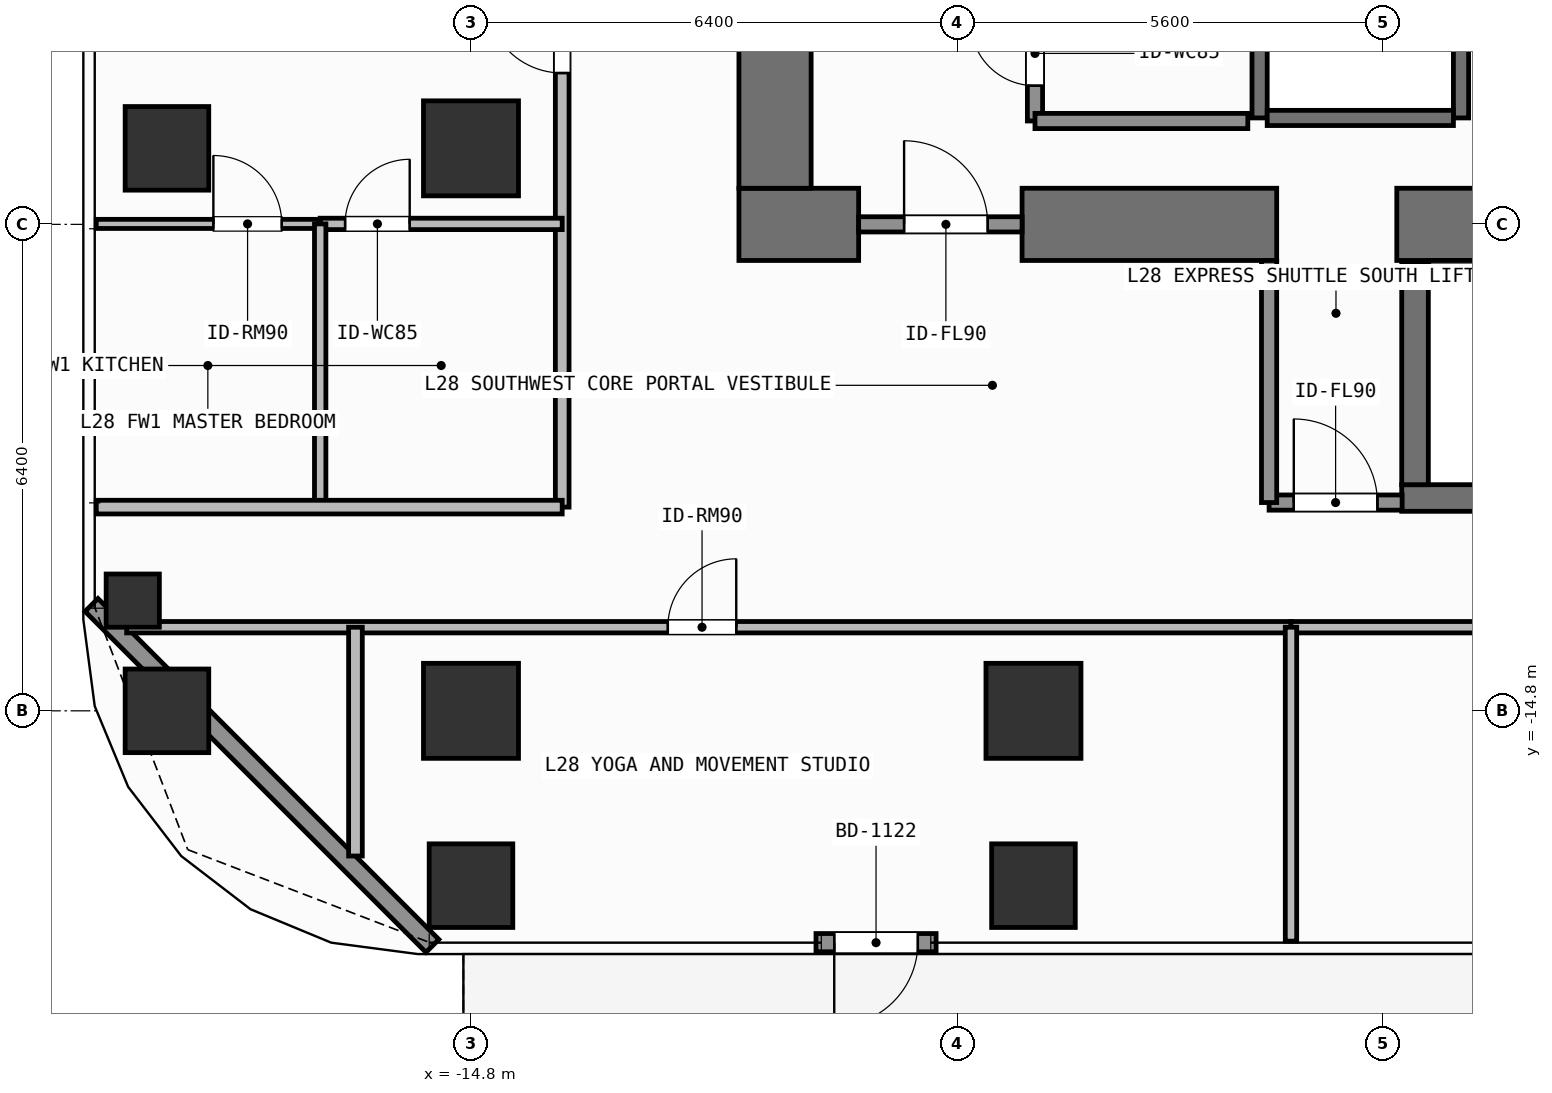
"""IFC4 building model, lengths in metres.
Left out: names, types, materials, properties, quantities, classifications, styles, units other than length and angle.
Written with IfcOpenShell. Run it as: python <this file> out.ifc"""

import sys

from ifc_helpers import new_model, si_unit, direction, frame, frame_2d, origin, origin_2d, place, context, subcontext, project, spatial, rectangle, hollow_rectangle, extrude, element, fill, save


model = new_model("IFC4")
c1 = context("Model", 3, precision=1e-05, world=origin(), true_north=direction((0.0, 1.0)))
c2 = subcontext(c1, "Body", "Model", "MODEL_VIEW")
j1 = project(units=[si_unit("LENGTHUNIT", "METRE"), si_unit("PLANEANGLEUNIT", "RADIAN")], contexts=[c1])
p1 = place(None, origin())
s1 = spatial("IfcSite", under=j1, at=p1, CompositionType="ELEMENT")
p2 = place(p1, origin())
s2 = spatial("IfcBuilding", under=s1, at=p2, CompositionType="ELEMENT")
p3 = place(p2, frame((0.0, 0.0, 113.4)))
s3 = spatial("IfcBuildingStorey", under=s2, at=p3, CompositionType="ELEMENT", Elevation=113.4)
p4 = place(p3, frame((-11.275, -8.4, 0.0), z_axis=(0.0, 0.0, 1.0), x_axis=(1.0, 0.0, 0.0)))
e1 = element("IfcWall", 1, at=p4, inside=s3, PredefinedType="SHEAR", context=c2, shape_type="SweptSolid", body=[
    extrude(rectangle(XDim=1.575, YDim=0.95, at=frame_2d((0.788, 0.0))), origin(), (0.0, 0.0, 1.0), 3.9),
])
p5 = place(p3, frame((-7.55, -8.4, 0.0), z_axis=(0.0, 0.0, 1.0), x_axis=(1.0, 0.0, 0.0)))
e2 = element("IfcWall", 2, at=p5, inside=s3, PredefinedType="SHEAR", context=c2, shape_type="SweptSolid", body=[
    extrude(rectangle(XDim=3.35, YDim=0.95, at=frame_2d((1.675, 0.0))), origin(), (0.0, 0.0, 1.0), 3.9),
])
p6 = place(p3, frame((-2.62, -8.4, 0.0), z_axis=(0.0, 0.0, 1.0), x_axis=(1.0, 0.0, 0.0)))
e3 = element("IfcWall", 3, at=p6, inside=s3, PredefinedType="SHEAR", context=c2, shape_type="SweptSolid", body=[
    extrude(rectangle(XDim=7.27, YDim=0.95, at=frame_2d((3.635, 0.0))), origin(), (0.0, 0.0, 1.0), 3.9),
])
p7 = place(p3, frame((-10.8, -7.925, 0.0), z_axis=(0.0, 0.0, 1.0), x_axis=(0.0, 1.0, 0.0)))
e4 = element("IfcWall", 4, at=p7, inside=s3, PredefinedType="SHEAR", context=c2, shape_type="SweptSolid", body=[
    extrude(rectangle(XDim=15.85, YDim=0.95, at=frame_2d((7.925, 0.0))), origin(), (0.0, 0.0, 1.0), 3.9),
])
p8 = place(p3, frame((-2.555, -12.0, 0.0), z_axis=(0.0, 0.0, 1.0), x_axis=(1.0, 0.0, 0.0)))
e5 = element("IfcWall", 5, at=p8, inside=s3, PredefinedType="SHEAR", context=c2, shape_type="SweptSolid", body=[
    extrude(rectangle(XDim=7.31, YDim=0.35, at=frame_2d((3.655, 0.0))), origin(), (0.0, 0.0, 1.0), 3.9),
])
p9 = place(p3, frame((-2.2, -8.95, 0.0), z_axis=(0.0, 0.0, 1.0), x_axis=(1.0, 0.0, 0.0)))
e6 = element("IfcWall", 6, at=p9, inside=s3, PredefinedType="SHEAR", context=c2, shape_type="SweptSolid", body=[
    extrude(rectangle(XDim=6.6, YDim=0.15, at=frame_2d((3.3, 0.0))), origin(), (0.0, 0.0, 1.0), 3.9),
])
p10 = place(p3, frame((-2.38, -11.825, 0.0), z_axis=(0.0, 0.0, 1.0), x_axis=(0.0, 1.0, 0.0)))
e7 = element("IfcWall", 7, at=p10, inside=s3, PredefinedType="SHEAR", context=c2, shape_type="SweptSolid", body=[
    extrude(rectangle(XDim=2.925, YDim=0.35, at=frame_2d((1.462, 0.0))), origin(), (0.0, 0.0, 1.0), 3.9),
])
for number, where, z_axis, x_axis in (
    (8, (-14.8, -14.8, 0.0), (0.0, 0.0, 1.0), (1.0, 0.0, 0.0)),
    (9, (-7.4, -14.8, 0.0), (0.0, 0.0, 1.0), (1.0, 0.0, 0.0)),
    (10, (-14.8, -7.4, 0.0), (0.0, 0.0, 1.0), (1.0, 0.0, 0.0)),
):
    element("IfcColumn", number, at=place(p3, frame(where, z_axis=z_axis, x_axis=x_axis)), inside=s3, PredefinedType="COLUMN", context=c2, shape_type="SweptSolid", body=[
        extrude(rectangle(XDim=1.25, YDim=1.25, at=origin_2d()), origin(), (0.0, 0.0, 1.0), 3.9),
    ])
for number, where, z_axis, x_axis in (
    (11, (-18.8, -14.8, 0.0), (0.0, 0.0, 1.0), (1.0, 0.0, 0.0)),
    (12, (-18.8, -7.4, 0.0), (0.0, 0.0, 1.0), (1.0, 0.0, 0.0)),
    (13, (-14.8, -17.1, 0.0), (0.0, 0.0, 1.0), (1.0, 0.0, 0.0)),
    (14, (-7.4, -17.1, 0.0), (0.0, 0.0, 1.0), (1.0, 0.0, 0.0)),
):
    element("IfcColumn", number, at=place(p3, frame(where, z_axis=z_axis, x_axis=x_axis)), inside=s3, PredefinedType="COLUMN", context=c2, shape_type="SweptSolid", body=[
        extrude(rectangle(XDim=1.1, YDim=1.1, at=origin_2d()), origin(), (0.0, 0.0, 1.0), 3.9),
    ])
p11 = place(p3, frame((-19.25, -13.35, 0.0), z_axis=(0.0, 0.0, 1.0), x_axis=(1.0, 0.0, 0.0)))
e15 = element("IfcColumn", 15, at=p11, inside=s3, PredefinedType="COLUMN", context=c2, shape_type="SweptSolid", body=[
    extrude(hollow_rectangle(XDim=0.7, YDim=0.7, WallThickness=0.032, at=origin_2d()), origin(), (0.0, 0.0, 1.0), 3.9),
])
p12 = place(p3, frame((-8.681, -17.85, 0.0), z_axis=(0.0, 0.0, 1.0), x_axis=(-1.0, 0.0, 0.0)))
e16 = element("IfcWall", 16, at=p12, inside=s3, PredefinedType="SOLIDWALL", context=c2, shape_type="SweptSolid", body=[
    extrude(rectangle(XDim=1.58, YDim=0.24, at=frame_2d((0.79, 0.0))), origin(), (0.0, 0.0, 1.0), 3.68),
])
p13 = place(p12, frame((0.24, 0.0, 0.0)))
e17 = element("IfcOpeningElement", 17, at=p13, cuts=e16, PredefinedType="OPENING", context=c2, shape_type="SweptSolid", body=[
    extrude(rectangle(XDim=1.1, YDim=2.2, at=frame_2d((0.55, 1.1))), frame((0.0, 0.13, 0.0), z_axis=(0.0, -1.0, 0.0), x_axis=(1.0, 0.0, 0.0)), (0.0, 0.0, 1.0), 0.26),
])
p14 = place(p3, frame((-15.308, -17.892, 0.0), z_axis=(0.0, 0.0, 1.0), x_axis=(-0.707126027686, 0.707087534163, 0.0)))
e18 = element("IfcWall", 18, at=p14, inside=s3, PredefinedType="SOLIDWALL", context=c2, shape_type="SweptSolid", body=[
    extrude(rectangle(XDim=6.342, YDim=0.24, at=frame_2d((3.171, 0.0))), origin(), (0.0, 0.0, 1.0), 3.68),
])
for number, where, z_axis, x_axis in (
    (19, (-4.425, -7.0, 0.0), (0.0, 0.0, 1.0), (0.0, 1.0, 0.0)),
    (20, (-1.775, -7.0, 0.0), (0.0, 0.0, 1.0), (0.0, 1.0, 0.0)),
):
    element("IfcWall", number, at=place(p3, frame(where, z_axis=z_axis, x_axis=x_axis)), inside=s3, PredefinedType="SHEAR", context=c2, shape_type="SweptSolid", body=[
        extrude(rectangle(XDim=2.8, YDim=0.2, at=frame_2d((1.4, 0.0))), origin(), (0.0, 0.0, 1.0), 3.68),
    ])
p15 = place(p3, frame((-4.325, -7.0, 0.0), z_axis=(0.0, 0.0, 1.0), x_axis=(1.0, 0.0, 0.0)))
e21 = element("IfcWall", 21, at=p15, inside=s3, PredefinedType="SHEAR", context=c2, shape_type="SweptSolid", body=[
    extrude(rectangle(XDim=2.45, YDim=0.2, at=frame_2d((1.225, 0.0))), origin(), (0.0, 0.0, 1.0), 3.68),
])
p16 = place(p3, frame((-9.7, -8.4, 0.0), z_axis=(0.0, 0.0, 1.0), x_axis=(1.0, 0.0, 0.0)))
e22 = element("IfcWall", 22, at=p16, inside=s3, PredefinedType="SOLIDWALL", context=c2, shape_type="SweptSolid", body=[
    extrude(rectangle(XDim=2.15, YDim=0.2, at=frame_2d((1.075, 0.0))), origin(), (0.0, 0.0, 1.0), 2.72),
])
p17 = place(p16, frame((0.598, 0.0, 0.0)))
e23 = element("IfcOpeningElement", 23, at=p17, cuts=e22, PredefinedType="OPENING", context=c2, shape_type="SweptSolid", body=[
    extrude(rectangle(XDim=1.1, YDim=2.15, at=frame_2d((0.55, 1.075))), frame((0.0, 0.11, 0.0), z_axis=(0.0, -1.0, 0.0), x_axis=(1.0, 0.0, 0.0)), (0.0, 0.0, 1.0), 0.22),
])
p18 = place(p3, frame((-4.3, -12.06, 0.0), z_axis=(0.0, 0.0, 1.0), x_axis=(1.0, 0.0, 0.0)))
e24 = element("IfcWall", 24, at=p18, inside=s3, PredefinedType="SOLIDWALL", context=c2, shape_type="SweptSolid", body=[
    extrude(rectangle(XDim=1.75, YDim=0.2, at=frame_2d((0.875, 0.0))), origin(), (0.0, 0.0, 1.0), 3.68),
])
p19 = place(p18, frame((0.325, 0.0, 0.0)))
e25 = element("IfcOpeningElement", 25, at=p19, cuts=e24, PredefinedType="OPENING", context=c2, shape_type="SweptSolid", body=[
    extrude(rectangle(XDim=1.1, YDim=2.15, at=frame_2d((0.55, 1.075))), frame((0.0, 0.11, 0.0), z_axis=(0.0, -1.0, 0.0), x_axis=(1.0, 0.0, 0.0)), (0.0, 0.0, 1.0), 0.22),
])
p20 = place(p3, frame((-7.38, -7.04, 0.0), z_axis=(0.0, 0.0, 1.0), x_axis=(0.0, 1.0, 0.0)))
e26 = element("IfcWall", 26, at=p20, inside=s3, PredefinedType="SOLIDWALL", context=c2, shape_type="SweptSolid", body=[
    extrude(rectangle(XDim=1.93, YDim=0.2, at=frame_2d((0.965, 0.0))), origin(), (0.0, 0.0, 1.0), 3.68),
])
p21 = place(p20, frame((0.464, 0.0, 0.0)))
e27 = element("IfcOpeningElement", 27, at=p21, cuts=e26, PredefinedType="OPENING", context=c2, shape_type="SweptSolid", body=[
    extrude(rectangle(XDim=0.85, YDim=2.1, at=frame_2d((0.425, 1.05))), frame((0.0, 0.11, 0.0), z_axis=(0.0, -1.0, 0.0), x_axis=(1.0, 0.0, 0.0)), (0.0, 0.0, 1.0), 0.22),
])
p22 = place(p3, frame((-19.33, -13.7, 0.0), z_axis=(0.0, 0.0, 1.0), x_axis=(1.0, 0.0, 0.0)))
e28 = element("IfcWall", 28, at=p22, inside=s3, PredefinedType="PARTITIONING", context=c2, shape_type="SweptSolid", body=[
    extrude(rectangle(XDim=15.318, YDim=0.15, at=frame_2d((7.659, 0.0))), origin(), (0.0, 0.0, 1.0), 3.68),
])
p23 = place(p22, frame((7.12, 0.0, 0.0)))
e29 = element("IfcOpeningElement", 29, at=p23, cuts=e28, PredefinedType="OPENING", context=c2, shape_type="SweptSolid", body=[
    extrude(rectangle(XDim=0.9, YDim=2.1, at=frame_2d((0.45, 1.05))), frame((0.0, 0.085, 0.0), z_axis=(0.0, -1.0, 0.0), x_axis=(1.0, 0.0, 0.0)), (0.0, 0.0, 1.0), 0.17),
])
p24 = place(p3, frame((-4.012, -13.7, 0.0), z_axis=(0.0, 0.0, 1.0), x_axis=(1.0, 0.0, 0.0)))
e30 = element("IfcWall", 30, at=p24, inside=s3, PredefinedType="PARTITIONING", context=c2, shape_type="SweptSolid", body=[
    extrude(rectangle(XDim=9.773, YDim=0.15, at=frame_2d((4.886, 0.0))), origin(), (0.0, 0.0, 1.0), 3.68),
])
p25 = place(p24, frame((4.793, 0.0, 0.0)))
e31 = element("IfcOpeningElement", 31, at=p25, cuts=e30, PredefinedType="OPENING", context=c2, shape_type="SweptSolid", body=[
    extrude(rectangle(XDim=0.9, YDim=2.1, at=frame_2d((0.45, 1.05))), frame((0.0, 0.085, 0.0), z_axis=(0.0, -1.0, 0.0), x_axis=(1.0, 0.0, 0.0)), (0.0, 0.0, 1.0), 0.17),
])
p26 = place(p3, frame((-13.6, -12.12, 0.0), z_axis=(0.0, 0.0, 1.0), x_axis=(0.0, 1.0, 0.0)))
e32 = element("IfcWall", 32, at=p26, inside=s3, PredefinedType="PARTITIONING", context=c2, shape_type="SweptSolid", body=[
    extrude(rectangle(XDim=13.138, YDim=0.18, at=frame_2d((6.569, 0.0))), origin(), (0.0, 0.0, 1.0), 3.68),
])
p27 = place(p26, frame((5.711, 0.0, 0.0)))
e33 = element("IfcOpeningElement", 33, at=p27, cuts=e32, PredefinedType="OPENING", context=c2, shape_type="SweptSolid", body=[
    extrude(rectangle(XDim=1.0, YDim=2.2, at=frame_2d((0.5, 1.1))), frame((0.0, 0.1, 0.0), z_axis=(0.0, -1.0, 0.0), x_axis=(1.0, 0.0, 0.0)), (0.0, 0.0, 1.0), 0.2),
])
p28 = place(p3, frame((-16.784, -8.394, 0.0), z_axis=(0.0, 0.0, 1.0), x_axis=(1.0, 0.0, 0.0)))
e34 = element("IfcWall", 34, at=p28, inside=s3, PredefinedType="PARTITIONING", context=c2, shape_type="SweptSolid", body=[
    extrude(rectangle(XDim=3.184, YDim=0.15, at=frame_2d((1.592, 0.0))), origin(), (0.0, 0.0, 1.0), 3.68),
])
p29 = place(p28, frame((0.328, 0.0, 0.0)))
e35 = element("IfcOpeningElement", 35, at=p29, cuts=e34, PredefinedType="OPENING", context=c2, shape_type="SweptSolid", body=[
    extrude(rectangle(XDim=0.85, YDim=2.1, at=frame_2d((0.425, 1.05))), frame((0.0, 0.085, 0.0), z_axis=(0.0, -1.0, 0.0), x_axis=(1.0, 0.0, 0.0)), (0.0, 0.0, 1.0), 0.17),
])
p30 = place(p3, frame((-19.73, -8.394, 0.0), z_axis=(0.0, 0.0, 1.0), x_axis=(1.0, 0.0, 0.0)))
e36 = element("IfcWall", 36, at=p30, inside=s3, PredefinedType="PARTITIONING", context=c2, shape_type="SweptSolid", body=[
    extrude(rectangle(XDim=2.946, YDim=0.12, at=frame_2d((1.473, 0.0))), origin(), (0.0, 0.0, 1.0), 3.68),
])
p31 = place(p30, frame((1.541, 0.0, 0.0)))
e37 = element("IfcOpeningElement", 37, at=p31, cuts=e36, PredefinedType="OPENING", context=c2, shape_type="SweptSolid", body=[
    extrude(rectangle(XDim=0.9, YDim=2.1, at=frame_2d((0.45, 1.05))), frame((0.0, 0.07, 0.0), z_axis=(0.0, -1.0, 0.0), x_axis=(1.0, 0.0, 0.0)), (0.0, 0.0, 1.0), 0.14),
])
p32 = place(p3, frame((-4.3, -12.06, 0.0), z_axis=(0.0, 0.0, 1.0), x_axis=(0.0, 1.0, 0.0)))
e38 = element("IfcWall", 38, at=p32, inside=s3, PredefinedType="SOLIDWALL", context=c2, shape_type="SweptSolid", body=[
    extrude(rectangle(XDim=3.185, YDim=0.2, at=frame_2d((1.593, 0.0))), origin(), (0.0, 0.0, 1.0), 3.68),
])
p33 = place(p3, frame((-7.38, -7.04, 0.0), z_axis=(0.0, 0.0, 1.0), x_axis=(1.0, 0.0, 0.0)))
e39 = element("IfcWall", 39, at=p33, inside=s3, PredefinedType="SOLIDWALL", context=c2, shape_type="SweptSolid", body=[
    extrude(rectangle(XDim=2.8, YDim=0.2, at=frame_2d((1.4, 0.0))), origin(), (0.0, 0.0, 1.0), 3.68),
])
p34 = place(p3, frame((-16.32, -16.71, 0.0), z_axis=(0.0, 0.0, 1.0), x_axis=(0.0, 1.0, 0.0)))
e40 = element("IfcWall", 40, at=p34, inside=s3, PredefinedType="PARTITIONING", context=c2, shape_type="SweptSolid", body=[
    extrude(rectangle(XDim=3.01, YDim=0.18, at=frame_2d((1.505, 0.0))), origin(), (0.0, 0.0, 1.0), 3.68),
])
p35 = place(p3, frame((-4.012, -17.83, 0.0), z_axis=(0.0, 0.0, 1.0), x_axis=(0.0, 1.0, 0.0)))
e41 = element("IfcWall", 41, at=p35, inside=s3, PredefinedType="PARTITIONING", context=c2, shape_type="SweptSolid", body=[
    extrude(rectangle(XDim=4.13, YDim=0.15, at=frame_2d((2.065, 0.0))), origin(), (0.0, 0.0, 1.0), 3.68),
])
p36 = place(p3, frame((-16.784, -12.12, 0.0), z_axis=(0.0, 0.0, 1.0), x_axis=(0.0, 1.0, 0.0)))
e42 = element("IfcWall", 42, at=p36, inside=s3, PredefinedType="PARTITIONING", context=c2, shape_type="SweptSolid", body=[
    extrude(rectangle(XDim=3.726, YDim=0.15, at=frame_2d((1.863, 0.0))), origin(), (0.0, 0.0, 1.0), 3.68),
])
p37 = place(p3, frame((-19.73, -12.12, 0.0), z_axis=(0.0, 0.0, 1.0), x_axis=(1.0, 0.0, 0.0)))
e43 = element("IfcWall", 43, at=p37, inside=s3, PredefinedType="PARTITIONING", context=c2, shape_type="SweptSolid", body=[
    extrude(rectangle(XDim=6.13, YDim=0.18, at=frame_2d((3.065, 0.0))), origin(), (0.0, 0.0, 1.0), 3.68),
])
p38 = place(p13, origin())
e44 = element("IfcDoor", 44, at=p38, inside=s3, OperationType="SINGLE_SWING_RIGHT", PredefinedType="DOOR", context=c2, shape_type="SweptSolid", body=[
    extrude(rectangle(XDim=1.1, YDim=2.2, at=frame_2d((0.55, 1.1))), frame((0.0, 0.025, 0.0), z_axis=(0.0, -1.0, 0.0), x_axis=(1.0, 0.0, 0.0)), (0.0, 0.0, 1.0), 0.05),
])
fill(e17, e44)
p39 = place(p17, origin())
e45 = element("IfcDoor", 45, at=p39, inside=s3, OperationType="SINGLE_SWING_LEFT", PredefinedType="DOOR", context=c2, shape_type="SweptSolid", body=[
    extrude(rectangle(XDim=1.1, YDim=2.15, at=frame_2d((0.55, 1.075))), frame((0.0, 0.025, 0.0), z_axis=(0.0, -1.0, 0.0), x_axis=(1.0, 0.0, 0.0)), (0.0, 0.0, 1.0), 0.05),
])
fill(e23, e45)
p40 = place(p19, origin())
e46 = element("IfcDoor", 46, at=p40, inside=s3, OperationType="SINGLE_SWING_LEFT", PredefinedType="DOOR", context=c2, shape_type="SweptSolid", body=[
    extrude(rectangle(XDim=1.1, YDim=2.15, at=frame_2d((0.55, 1.075))), frame((0.0, 0.025, 0.0), z_axis=(0.0, -1.0, 0.0), x_axis=(1.0, 0.0, 0.0)), (0.0, 0.0, 1.0), 0.05),
])
fill(e25, e46)
p41 = place(p21, origin())
e47 = element("IfcDoor", 47, at=p41, inside=s3, OperationType="SINGLE_SWING_RIGHT", PredefinedType="DOOR", context=c2, shape_type="SweptSolid", body=[
    extrude(rectangle(XDim=0.85, YDim=2.1, at=frame_2d((0.425, 1.05))), frame((0.0, 0.025, 0.0), z_axis=(0.0, -1.0, 0.0), x_axis=(1.0, 0.0, 0.0)), (0.0, 0.0, 1.0), 0.05),
])
fill(e27, e47)
p42 = place(p23, origin())
e48 = element("IfcDoor", 48, at=p42, inside=s3, OperationType="SINGLE_SWING_RIGHT", PredefinedType="DOOR", context=c2, shape_type="SweptSolid", body=[
    extrude(rectangle(XDim=0.9, YDim=2.1, at=frame_2d((0.45, 1.05))), frame((0.0, 0.025, 0.0), z_axis=(0.0, -1.0, 0.0), x_axis=(1.0, 0.0, 0.0)), (0.0, 0.0, 1.0), 0.05),
])
fill(e29, e48)
p43 = place(p27, origin())
e49 = element("IfcDoor", 49, at=p43, inside=s3, OperationType="SINGLE_SWING_RIGHT", PredefinedType="DOOR", context=c2, shape_type="SweptSolid", body=[
    extrude(rectangle(XDim=1.0, YDim=2.2, at=frame_2d((0.5, 1.1))), frame((0.0, 0.025, 0.0), z_axis=(0.0, -1.0, 0.0), x_axis=(1.0, 0.0, 0.0)), (0.0, 0.0, 1.0), 0.05),
])
fill(e33, e49)
p44 = place(p29, origin())
e50 = element("IfcDoor", 50, at=p44, inside=s3, OperationType="SINGLE_SWING_RIGHT", PredefinedType="DOOR", context=c2, shape_type="SweptSolid", body=[
    extrude(rectangle(XDim=0.85, YDim=2.1, at=frame_2d((0.425, 1.05))), frame((0.0, 0.025, 0.0), z_axis=(0.0, -1.0, 0.0), x_axis=(1.0, 0.0, 0.0)), (0.0, 0.0, 1.0), 0.05),
])
fill(e35, e50)
p45 = place(p31, origin())
e51 = element("IfcDoor", 51, at=p45, inside=s3, OperationType="SINGLE_SWING_LEFT", PredefinedType="DOOR", context=c2, shape_type="SweptSolid", body=[
    extrude(rectangle(XDim=0.9, YDim=2.1, at=frame_2d((0.45, 1.05))), frame((0.0, 0.025, 0.0), z_axis=(0.0, -1.0, 0.0), x_axis=(1.0, 0.0, 0.0)), (0.0, 0.0, 1.0), 0.05),
])
fill(e37, e51)
save(model, sys.argv[1])
